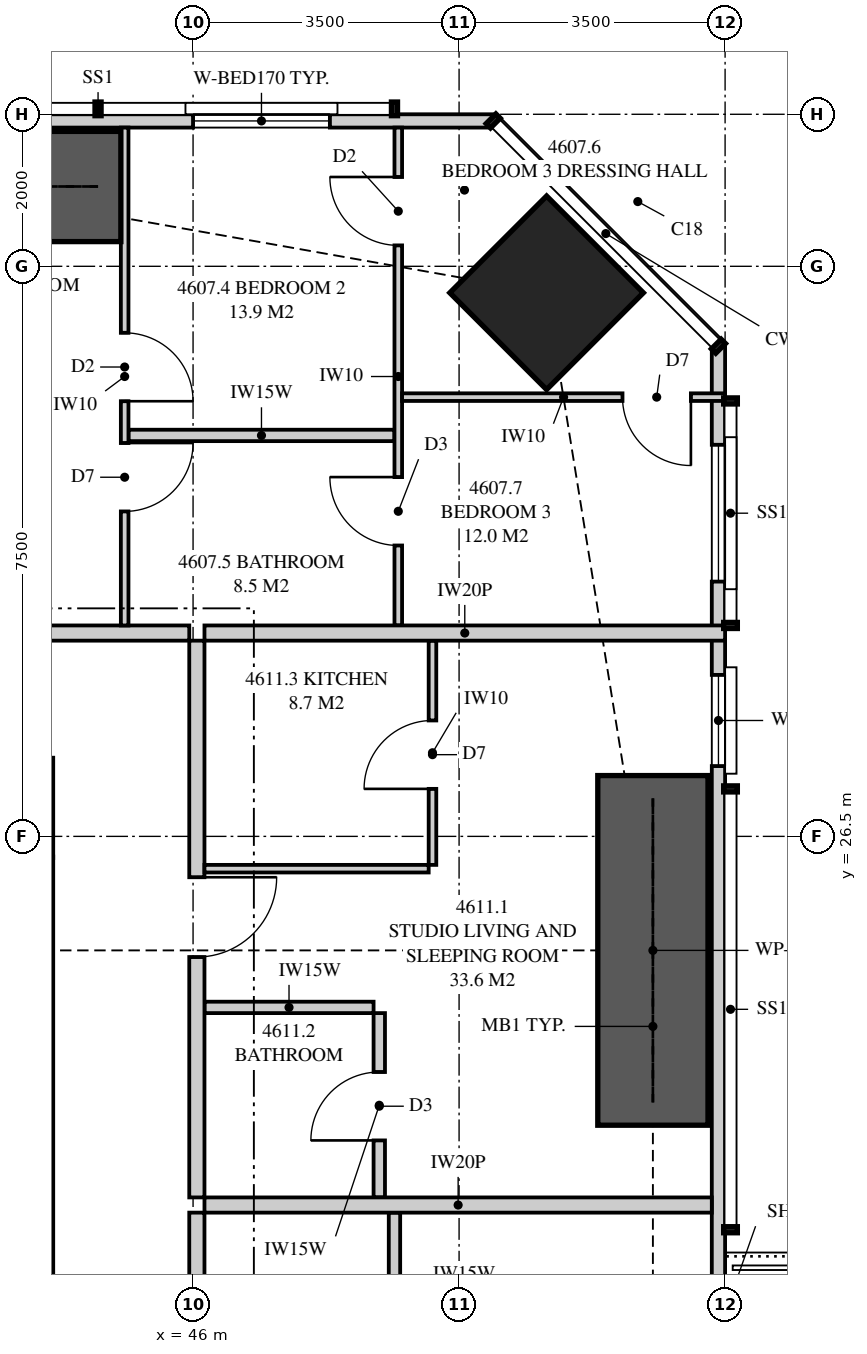
"""IFC4 building model, lengths in metres.
Left out: names, types, materials, properties, quantities, classifications, styles, units other than length and angle.
Written with IfcOpenShell. Run it as: python <this file> out.ifc"""

import sys

from ifc_helpers import new_model, si_unit, direction, frame, frame_2d, origin, origin_2d, place, context, subcontext, project, spatial, polyline, rectangle, outline, extrude, element, fill, save


model = new_model("IFC4")
c1 = context("Model", 3, precision=1e-05, world=origin(), true_north=direction((0.0, 1.0)))
c2 = subcontext(c1, "Body", "Model", "MODEL_VIEW")
j1 = project(units=[si_unit("LENGTHUNIT", "METRE"), si_unit("PLANEANGLEUNIT", "RADIAN")], contexts=[c1])
p1 = place(None, origin())
s1 = spatial("IfcSite", under=j1, at=p1, CompositionType="ELEMENT")
p2 = place(p1, origin())
s2 = spatial("IfcBuilding", under=s1, at=p2, CompositionType="ELEMENT")
p3 = place(p2, frame((0.0, 0.0, 171.1)))
s3 = spatial("IfcBuildingStorey", under=s2, at=p3, CompositionType="ELEMENT", Elevation=171.1)
p4 = place(p3, frame((50.652, 33.652, 0.0), z_axis=(0.0, 0.0, 1.0), x_axis=(0.707106781187, 0.707106781187, 0.0)))
e1 = element("IfcColumn", 1, at=p4, inside=s3, PredefinedType="COLUMN", context=c2, shape_type="SweptSolid", body=[
    extrude(rectangle(XDim=1.8, YDim=1.8, at=origin_2d()), origin(), (0.0, 0.0, 1.0), 3.35),
])
p5 = place(p3, frame((43.8, 19.3, 0.0), z_axis=(0.0, 0.0, 1.0), x_axis=(0.0, 1.0, 0.0)))
e2 = element("IfcWall", 2, at=p5, inside=s3, PredefinedType="SHEAR", context=c2, shape_type="SweptSolid", body=[
    extrude(rectangle(XDim=6.925, YDim=0.7, at=frame_2d((3.462, 0.0))), origin(), (0.0, 0.0, 1.0), 3.35),
])
p6 = place(p3, frame((52.913, 3.051, 0.0), z_axis=(0.0, 0.0, 1.0), x_axis=(0.0, 1.0, 0.0)))
e3 = element("IfcWall", 3, at=p6, inside=s3, PredefinedType="SOLIDWALL", context=c2, shape_type="SweptSolid", body=[
    extrude(outline(polyline([(0.0, 0.0), (29.897, 0.0), (29.897, 3.11), (22.167, 3.11), (22.167, 2.15), (22.074, 2.15), (22.074, 3.11), (21.949, 3.11), (21.949, 2.15), (9.949, 2.15), (9.949, 3.11), (9.847, 3.11), (9.847, 2.15), (9.706, 2.15), (9.706, 3.11), (0.0, 3.11), (0.0, 0.0)])), frame((0.0, 0.087, 0.0), z_axis=(0.0, -1.0, 0.0), x_axis=(1.0, 0.0, 0.0)), (0.0, 0.0, 1.0), 0.175),
])
p7 = place(p6, frame((1.797, 0.0, 0.4)))
e4 = element("IfcOpeningElement", 4, at=p7, cuts=e3, PredefinedType="OPENING", context=c2, shape_type="SweptSolid", body=[
    extrude(rectangle(XDim=1.8, YDim=1.7, at=frame_2d((0.9, 0.85))), frame((0.0, 0.097, 0.0), z_axis=(0.0, -1.0, 0.0), x_axis=(1.0, 0.0, 0.0)), (0.0, 0.0, 1.0), 0.195),
])
p8 = place(p6, frame((5.674, 0.0, 0.4)))
e5 = element("IfcOpeningElement", 5, at=p8, cuts=e3, PredefinedType="OPENING", context=c2, shape_type="SweptSolid", body=[
    extrude(rectangle(XDim=1.8, YDim=1.7, at=frame_2d((0.9, 0.85))), frame((0.0, 0.097, 0.0), z_axis=(0.0, -1.0, 0.0), x_axis=(1.0, 0.0, 0.0)), (0.0, 0.0, 1.0), 0.195),
])
p9 = place(p6, frame((12.349, 0.0, 0.4)))
e6 = element("IfcOpeningElement", 6, at=p9, cuts=e3, PredefinedType="OPENING", context=c2, shape_type="SweptSolid", body=[
    extrude(rectangle(XDim=2.4, YDim=1.7, at=frame_2d((1.2, 0.85))), frame((0.0, 0.097, 0.0), z_axis=(0.0, -1.0, 0.0), x_axis=(1.0, 0.0, 0.0)), (0.0, 0.0, 1.0), 0.195),
])
p10 = place(p6, frame((15.274, 0.0, 0.0)))
e7 = element("IfcOpeningElement", 7, at=p10, cuts=e3, PredefinedType="OPENING", context=c2, shape_type="SweptSolid", body=[
    extrude(rectangle(XDim=1.8, YDim=2.1, at=frame_2d((0.9, 1.05))), frame((0.0, 0.097, 0.0), z_axis=(0.0, -1.0, 0.0), x_axis=(1.0, 0.0, 0.0)), (0.0, 0.0, 1.0), 0.195),
])
p11 = place(p6, frame((24.373, 0.0, 0.4)))
e8 = element("IfcOpeningElement", 8, at=p11, cuts=e3, PredefinedType="OPENING", context=c2, shape_type="SweptSolid", body=[
    extrude(rectangle(XDim=1.2, YDim=1.7, at=frame_2d((0.6, 0.85))), frame((0.0, 0.097, 0.0), z_axis=(0.0, -1.0, 0.0), x_axis=(1.0, 0.0, 0.0)), (0.0, 0.0, 1.0), 0.195),
])
p12 = place(p6, frame((26.801, 0.0, 0.4)))
e9 = element("IfcOpeningElement", 9, at=p12, cuts=e3, PredefinedType="OPENING", context=c2, shape_type="SweptSolid", body=[
    extrude(rectangle(XDim=1.8, YDim=1.7, at=frame_2d((0.9, 0.85))), frame((0.0, 0.097, 0.0), z_axis=(0.0, -1.0, 0.0), x_axis=(1.0, 0.0, 0.0)), (0.0, 0.0, 1.0), 0.195),
])
p13 = place(p3, frame((49.949, 35.913, 0.0), z_axis=(0.0, 0.0, 1.0), x_axis=(-1.0, 0.0, 0.0)))
e10 = element("IfcWall", 10, at=p13, inside=s3, PredefinedType="SOLIDWALL", context=c2, shape_type="SweptSolid", body=[
    extrude(outline(polyline([(0.0, 0.0), (34.897, 0.0), (34.897, 3.11), (27.91, 3.11), (27.91, 2.15), (27.836, 2.15), (27.836, 3.11), (27.699, 3.11), (27.699, 2.15), (7.199, 2.15), (7.199, 3.11), (7.062, 3.11), (7.062, 2.15), (6.987, 2.15), (6.987, 3.11), (0.0, 3.11), (0.0, 0.0)])), frame((0.0, 0.087, 0.0), z_axis=(0.0, -1.0, 0.0), x_axis=(1.0, 0.0, 0.0)), (0.0, 0.0, 1.0), 0.175),
])
p14 = place(p13, frame((2.149, 0.0, 0.4)))
e11 = element("IfcOpeningElement", 11, at=p14, cuts=e10, PredefinedType="OPENING", context=c2, shape_type="SweptSolid", body=[
    extrude(rectangle(XDim=1.8, YDim=1.7, at=frame_2d((0.9, 0.85))), frame((0.0, 0.097, 0.0), z_axis=(0.0, -1.0, 0.0), x_axis=(1.0, 0.0, 0.0)), (0.0, 0.0, 1.0), 0.195),
])
p15 = place(p13, frame((10.299, 0.0, 0.0)))
e12 = element("IfcOpeningElement", 12, at=p15, cuts=e10, PredefinedType="OPENING", context=c2, shape_type="SweptSolid", body=[
    extrude(rectangle(XDim=1.8, YDim=2.1, at=frame_2d((0.9, 1.05))), frame((0.0, 0.097, 0.0), z_axis=(0.0, -1.0, 0.0), x_axis=(1.0, 0.0, 0.0)), (0.0, 0.0, 1.0), 0.195),
])
p16 = place(p13, frame((13.231, 0.0, 0.4)))
e13 = element("IfcOpeningElement", 13, at=p16, cuts=e10, PredefinedType="OPENING", context=c2, shape_type="SweptSolid", body=[
    extrude(rectangle(XDim=1.8, YDim=1.7, at=frame_2d((0.9, 0.85))), frame((0.0, 0.097, 0.0), z_axis=(0.0, -1.0, 0.0), x_axis=(1.0, 0.0, 0.0)), (0.0, 0.0, 1.0), 0.195),
])
p17 = place(p13, frame((22.699, 0.0, 0.0)))
e14 = element("IfcOpeningElement", 14, at=p17, cuts=e10, PredefinedType="OPENING", context=c2, shape_type="SweptSolid", body=[
    extrude(rectangle(XDim=1.8, YDim=2.1, at=frame_2d((0.9, 1.05))), frame((0.0, 0.097, 0.0), z_axis=(0.0, -1.0, 0.0), x_axis=(1.0, 0.0, 0.0)), (0.0, 0.0, 1.0), 0.195),
])
p18 = place(p13, frame((19.853, 0.0, 0.4)))
e15 = element("IfcOpeningElement", 15, at=p18, cuts=e10, PredefinedType="OPENING", context=c2, shape_type="SweptSolid", body=[
    extrude(rectangle(XDim=2.4, YDim=1.7, at=frame_2d((1.2, 0.85))), frame((0.0, 0.097, 0.0), z_axis=(0.0, -1.0, 0.0), x_axis=(1.0, 0.0, 0.0)), (0.0, 0.0, 1.0), 0.195),
])
p19 = place(p13, frame((30.104, 0.0, 0.4)))
e16 = element("IfcOpeningElement", 16, at=p19, cuts=e10, PredefinedType="OPENING", context=c2, shape_type="SweptSolid", body=[
    extrude(rectangle(XDim=2.4, YDim=1.7, at=frame_2d((1.2, 0.85))), frame((0.0, 0.097, 0.0), z_axis=(0.0, -1.0, 0.0), x_axis=(1.0, 0.0, 0.0)), (0.0, 0.0, 1.0), 0.195),
])
p20 = place(p3, frame((45.1, 35.825, 0.0), z_axis=(0.0, 0.0, 1.0), x_axis=(0.0, -1.0, 0.0)))
e17 = element("IfcWall", 17, at=p20, inside=s3, PredefinedType="PARTITIONING", context=c2, shape_type="SweptSolid", body=[
    extrude(outline(polyline([(0.0, 0.0), (6.55, 0.0), (6.55, 3.11), (2.064, 3.11), (2.064, 2.15), (0.318, 2.15), (0.318, 3.11), (0.0, 3.11), (0.0, 0.0)])), frame((0.0, 0.05, 0.0), z_axis=(0.0, -1.0, 0.0), x_axis=(1.0, 0.0, 0.0)), (0.0, 0.0, 1.0), 0.1),
])
p21 = place(p20, frame((2.7, 0.0, 0.0)))
e18 = element("IfcOpeningElement", 18, at=p21, cuts=e17, PredefinedType="OPENING", context=c2, shape_type="SweptSolid", body=[
    extrude(rectangle(XDim=0.9, YDim=2.1, at=frame_2d((0.45, 1.05))), frame((0.0, 0.06, 0.0), z_axis=(0.0, -1.0, 0.0), x_axis=(1.0, 0.0, 0.0)), (0.0, 0.0, 1.0), 0.12),
])
p22 = place(p20, frame((4.15, 0.0, 0.0)))
e19 = element("IfcOpeningElement", 19, at=p22, cuts=e17, PredefinedType="OPENING", context=c2, shape_type="SweptSolid", body=[
    extrude(rectangle(XDim=0.9, YDim=2.1, at=frame_2d((0.45, 1.05))), frame((0.0, 0.06, 0.0), z_axis=(0.0, -1.0, 0.0), x_axis=(1.0, 0.0, 0.0)), (0.0, 0.0, 1.0), 0.12),
])
p23 = place(p3, frame((48.7, 35.825, 0.0), z_axis=(0.0, 0.0, 1.0), x_axis=(0.0, -1.0, 0.0)))
e20 = element("IfcWall", 20, at=p23, inside=s3, PredefinedType="PARTITIONING", context=c2, shape_type="SweptSolid", body=[
    extrude(outline(polyline([(0.0, 0.0), (6.55, 0.0), (6.55, 3.11), (2.701, 3.11), (2.701, 2.15), (0.955, 2.15), (0.955, 3.11), (0.0, 3.11), (0.0, 0.0)])), frame((0.0, 0.05, 0.0), z_axis=(0.0, -1.0, 0.0), x_axis=(1.0, 0.0, 0.0)), (0.0, 0.0, 1.0), 0.1),
])
p24 = place(p23, frame((0.65, 0.0, 0.0)))
e21 = element("IfcOpeningElement", 21, at=p24, cuts=e20, PredefinedType="OPENING", context=c2, shape_type="SweptSolid", body=[
    extrude(rectangle(XDim=0.9, YDim=2.1, at=frame_2d((0.45, 1.05))), frame((0.0, 0.06, 0.0), z_axis=(0.0, -1.0, 0.0), x_axis=(1.0, 0.0, 0.0)), (0.0, 0.0, 1.0), 0.12),
])
p25 = place(p23, frame((4.598, 0.0, 0.0)))
e22 = element("IfcOpeningElement", 22, at=p25, cuts=e20, PredefinedType="OPENING", context=c2, shape_type="SweptSolid", body=[
    extrude(rectangle(XDim=0.9, YDim=2.1, at=frame_2d((0.45, 1.05))), frame((0.0, 0.06, 0.0), z_axis=(0.0, -1.0, 0.0), x_axis=(1.0, 0.0, 0.0)), (0.0, 0.0, 1.0), 0.12),
])
p26 = place(p3, frame((45.15, 31.775, 0.0), z_axis=(0.0, 0.0, 1.0), x_axis=(1.0, 0.0, 0.0)))
e23 = element("IfcWall", 23, at=p26, inside=s3, PredefinedType="PLUMBINGWALL", context=c2, shape_type="SweptSolid", body=[
    extrude(rectangle(XDim=3.5, YDim=0.15, at=frame_2d((1.75, 0.0))), origin(), (0.0, 0.0, 1.0), 3.11),
])
p27 = place(p3, frame((48.75, 32.279, 0.0), z_axis=(0.0, 0.0, 1.0), x_axis=(1.0, 0.0, 0.0)))
e24 = element("IfcWall", 24, at=p27, inside=s3, PredefinedType="PARTITIONING", context=c2, shape_type="SweptSolid", body=[
    extrude(outline(polyline([(0.0, 0.0), (4.25, 0.0), (4.25, 3.11), (2.995, 3.11), (2.995, 2.15), (1.252, 2.15), (1.252, 3.11), (0.0, 3.11), (0.0, 0.0)])), frame((0.0, 0.05, 0.0), z_axis=(0.0, -1.0, 0.0), x_axis=(1.0, 0.0, 0.0)), (0.0, 0.0, 1.0), 0.1),
])
p28 = place(p27, frame((2.9, 0.0, 0.0)))
e25 = element("IfcOpeningElement", 25, at=p28, cuts=e24, PredefinedType="OPENING", context=c2, shape_type="SweptSolid", body=[
    extrude(rectangle(XDim=0.9, YDim=2.1, at=frame_2d((0.45, 1.05))), frame((0.0, 0.06, 0.0), z_axis=(0.0, -1.0, 0.0), x_axis=(1.0, 0.0, 0.0)), (0.0, 0.0, 1.0), 0.12),
])
p29 = place(p3, frame((46.15, 29.175, 0.0), z_axis=(0.0, 0.0, 1.0), x_axis=(1.0, 0.0, 0.0)))
e26 = element("IfcWall", 26, at=p29, inside=s3, PredefinedType="PARTITIONING", context=c2, shape_type="SweptSolid", body=[
    extrude(outline(polyline([(0.0, 0.0), (6.85, 0.0), (6.85, 3.11), (6.147, 3.11), (6.147, 2.15), (4.303, 2.15), (4.303, 3.11), (0.0, 3.11), (0.0, 0.0)])), frame((0.0, 0.1, 0.0), z_axis=(0.0, -1.0, 0.0), x_axis=(1.0, 0.0, 0.0)), (0.0, 0.0, 1.0), 0.2),
])
p30 = place(p3, frame((52.825, 21.65, 0.0), z_axis=(0.0, 0.0, 1.0), x_axis=(-1.0, 0.0, 0.0)))
e27 = element("IfcWall", 27, at=p30, inside=s3, PredefinedType="PARTITIONING", context=c2, shape_type="SweptSolid", body=[
    extrude(outline(polyline([(0.0, 0.0), (6.675, 0.0), (6.675, 3.11), (1.685, 3.11), (1.685, 2.15), (0.0, 2.15), (0.0, 3.11), (0.0, 0.0)])), frame((0.0, 0.1, 0.0), z_axis=(0.0, -1.0, 0.0), x_axis=(1.0, 0.0, 0.0)), (0.0, 0.0, 1.0), 0.2),
])
p31 = place(p3, frame((48.65, 18.1, 0.0), z_axis=(0.0, 0.0, 1.0), x_axis=(0.0, 1.0, 0.0)))
e28 = element("IfcWall", 28, at=p31, inside=s3, PredefinedType="PLUMBINGWALL", context=c2, shape_type="SweptSolid", body=[
    extrude(rectangle(XDim=3.45, YDim=0.15, at=frame_2d((1.725, 0.0))), origin(), (0.0, 0.0, 1.0), 3.11),
])
p32 = place(p3, frame((46.05, 21.75, 0.0), z_axis=(0.0, 0.0, 1.0), x_axis=(0.0, 1.0, 0.0)))
e29 = element("IfcWall", 29, at=p32, inside=s3, PredefinedType="PARTITIONING", context=c2, shape_type="SweptSolid", body=[
    extrude(outline(polyline([(0.0, 0.0), (7.325, 0.0), (7.325, 3.11), (3.587, 3.11), (3.587, 2.541), (2.913, 2.541), (2.913, 3.11), (0.0, 3.11), (0.0, 0.0)])), frame((0.0, 0.1, 0.0), z_axis=(0.0, -1.0, 0.0), x_axis=(1.0, 0.0, 0.0)), (0.0, 0.0, 1.0), 0.2),
])
p33 = place(p32, frame((3.163, 0.0, 0.0)))
e30 = element("IfcOpeningElement", 30, at=p33, cuts=e29, PredefinedType="OPENING", context=c2, shape_type="SweptSolid", body=[
    extrude(rectangle(XDim=1.05, YDim=2.2, at=frame_2d((0.525, 1.1))), frame((0.0, 0.11, 0.0), z_axis=(0.0, -1.0, 0.0), x_axis=(1.0, 0.0, 0.0)), (0.0, 0.0, 1.0), 0.22),
])
p34 = place(p3, frame((48.45, 21.75, 0.0), z_axis=(0.0, 0.0, 1.0), x_axis=(0.0, 1.0, 0.0)))
e31 = element("IfcWall", 31, at=p34, inside=s3, PredefinedType="PLUMBINGWALL", context=c2, shape_type="SweptSolid", body=[
    extrude(rectangle(XDim=2.425, YDim=0.15, at=frame_2d((1.212, 0.0))), origin(), (0.0, 0.0, 1.0), 3.11),
])
p35 = place(p34, frame((0.75, 0.0, 0.0)))
e32 = element("IfcOpeningElement", 32, at=p35, cuts=e31, PredefinedType="OPENING", context=c2, shape_type="SweptSolid", body=[
    extrude(rectangle(XDim=0.9, YDim=2.1, at=frame_2d((0.45, 1.05))), frame((0.0, 0.085, 0.0), z_axis=(0.0, -1.0, 0.0), x_axis=(1.0, 0.0, 0.0)), (0.0, 0.0, 1.0), 0.17),
])
p36 = place(p3, frame((48.375, 24.25, 0.0), z_axis=(0.0, 0.0, 1.0), x_axis=(-1.0, 0.0, 0.0)))
e33 = element("IfcWall", 33, at=p36, inside=s3, PredefinedType="PLUMBINGWALL", context=c2, shape_type="SweptSolid", body=[
    extrude(rectangle(XDim=2.225, YDim=0.15, at=frame_2d((1.113, 0.0))), origin(), (0.0, 0.0, 1.0), 3.11),
])
p37 = place(p3, frame((49.15, 26.125, 0.0), z_axis=(0.0, 0.0, 1.0), x_axis=(0.0, 1.0, 0.0)))
e34 = element("IfcWall", 34, at=p37, inside=s3, PredefinedType="PARTITIONING", context=c2, shape_type="SweptSolid", body=[
    extrude(rectangle(XDim=2.95, YDim=0.1, at=frame_2d((1.475, 0.0))), origin(), (0.0, 0.0, 1.0), 3.11),
])
p38 = place(p37, frame((1.0, 0.0, 0.0)))
e35 = element("IfcOpeningElement", 35, at=p38, cuts=e34, PredefinedType="OPENING", context=c2, shape_type="SweptSolid", body=[
    extrude(rectangle(XDim=0.9, YDim=2.1, at=frame_2d((0.45, 1.05))), frame((0.0, 0.06, 0.0), z_axis=(0.0, -1.0, 0.0), x_axis=(1.0, 0.0, 0.0)), (0.0, 0.0, 1.0), 0.12),
])
p39 = place(p3, frame((49.1, 26.075, 0.0), z_axis=(0.0, 0.0, 1.0), x_axis=(-1.0, 0.0, 0.0)))
e36 = element("IfcWall", 36, at=p39, inside=s3, PredefinedType="PARTITIONING", context=c2, shape_type="SweptSolid", body=[
    extrude(rectangle(XDim=2.95, YDim=0.1, at=frame_2d((1.475, 0.0))), origin(), (0.0, 0.0, 1.0), 3.11),
])
p40 = place(p3, frame((43.75, 29.175, 0.0), z_axis=(0.0, 0.0, 1.0), x_axis=(1.0, 0.0, 0.0)))
e37 = element("IfcWall", 37, at=p40, inside=s3, PredefinedType="PARTITIONING", context=c2, shape_type="SweptSolid", body=[
    extrude(rectangle(XDim=2.2, YDim=0.2, at=frame_2d((1.1, 0.0))), origin(), (0.0, 0.0, 1.0), 3.11),
])
p41 = place(p3, frame((46.05, 16.738, 0.0), z_axis=(0.0, 0.0, 1.0), x_axis=(0.0, 1.0, 0.0)))
e38 = element("IfcWall", 38, at=p41, inside=s3, PredefinedType="PARTITIONING", context=c2, shape_type="SweptSolid", body=[
    extrude(rectangle(XDim=4.812, YDim=0.2, at=frame_2d((2.406, 0.0))), origin(), (0.0, 0.0, 1.0), 3.11),
])
for number, where, z_axis, x_axis in (
    (39, (52.05, 22.7, 0.0), (0.0, 0.0, 1.0), (0.0, 1.0, 0.0)),
    (40, (40.45, 35.05, 0.0), (0.0, 0.0, 1.0), (1.0, 0.0, 0.0)),
):
    element("IfcWall", number, at=place(p3, frame(where, z_axis=z_axis, x_axis=x_axis)), inside=s3, PredefinedType="SHEAR", context=c2, shape_type="SweptSolid", body=[
        extrude(rectangle(XDim=4.6, YDim=1.45, at=frame_2d((2.3, 0.0))), origin(), (0.0, 0.0, 1.0), 3.35),
    ])
p42 = place(p11, origin())
e41 = element("IfcWindow", 41, at=p42, inside=s3, PartitioningType="SINGLE_PANEL", PredefinedType="WINDOW", context=c2, shape_type="SweptSolid", body=[
    extrude(rectangle(XDim=1.2, YDim=1.7, at=frame_2d((0.6, 0.85))), frame((0.0, 0.03, 0.0), z_axis=(0.0, -1.0, 0.0), x_axis=(1.0, 0.0, 0.0)), (0.0, 0.0, 1.0), 0.06),
])
fill(e8, e41)
p43 = place(p12, origin())
e42 = element("IfcWindow", 42, at=p43, inside=s3, PartitioningType="SINGLE_PANEL", PredefinedType="WINDOW", context=c2, shape_type="SweptSolid", body=[
    extrude(rectangle(XDim=1.8, YDim=1.7, at=frame_2d((0.9, 0.85))), frame((0.0, 0.03, 0.0), z_axis=(0.0, -1.0, 0.0), x_axis=(1.0, 0.0, 0.0)), (0.0, 0.0, 1.0), 0.06),
])
fill(e9, e42)
p44 = place(p14, origin())
e43 = element("IfcWindow", 43, at=p44, inside=s3, PartitioningType="SINGLE_PANEL", PredefinedType="WINDOW", context=c2, shape_type="SweptSolid", body=[
    extrude(rectangle(XDim=1.8, YDim=1.7, at=frame_2d((0.9, 0.85))), frame((0.0, 0.03, 0.0), z_axis=(0.0, -1.0, 0.0), x_axis=(1.0, 0.0, 0.0)), (0.0, 0.0, 1.0), 0.06),
])
fill(e11, e43)
p45 = place(p21, origin())
e44 = element("IfcDoor", 44, at=p45, inside=s3, OperationType="SINGLE_SWING_RIGHT", PredefinedType="DOOR", context=c2, shape_type="SweptSolid", body=[
    extrude(rectangle(XDim=0.9, YDim=2.1, at=frame_2d((0.45, 1.05))), frame((0.0, 0.025, 0.0), z_axis=(0.0, -1.0, 0.0), x_axis=(1.0, 0.0, 0.0)), (0.0, 0.0, 1.0), 0.05),
])
fill(e18, e44)
p46 = place(p22, origin())
e45 = element("IfcDoor", 45, at=p46, inside=s3, OperationType="SINGLE_SWING_LEFT", PredefinedType="DOOR", context=c2, shape_type="SweptSolid", body=[
    extrude(rectangle(XDim=0.9, YDim=2.1, at=frame_2d((0.45, 1.05))), frame((0.0, 0.025, 0.0), z_axis=(0.0, -1.0, 0.0), x_axis=(1.0, 0.0, 0.0)), (0.0, 0.0, 1.0), 0.05),
])
fill(e19, e45)
p47 = place(p28, frame((0.9, 0.0, 0.0), z_axis=(0.0, 0.0, 1.0), x_axis=(-1.0, 0.0, 0.0)))
e46 = element("IfcDoor", 46, at=p47, inside=s3, OperationType="SINGLE_SWING_LEFT", PredefinedType="DOOR", context=c2, shape_type="SweptSolid", body=[
    extrude(rectangle(XDim=0.9, YDim=2.1, at=frame_2d((0.45, 1.05))), frame((0.0, 0.025, 0.0), z_axis=(0.0, -1.0, 0.0), x_axis=(1.0, 0.0, 0.0)), (0.0, 0.0, 1.0), 0.05),
])
fill(e25, e46)
p48 = place(p24, frame((0.9, 0.0, 0.0), z_axis=(0.0, 0.0, 1.0), x_axis=(-1.0, 0.0, 0.0)))
e47 = element("IfcDoor", 47, at=p48, inside=s3, OperationType="SINGLE_SWING_RIGHT", PredefinedType="DOOR", context=c2, shape_type="SweptSolid", body=[
    extrude(rectangle(XDim=0.9, YDim=2.1, at=frame_2d((0.45, 1.05))), frame((0.0, 0.025, 0.0), z_axis=(0.0, -1.0, 0.0), x_axis=(1.0, 0.0, 0.0)), (0.0, 0.0, 1.0), 0.05),
])
fill(e21, e47)
p49 = place(p25, frame((0.9, 0.0, 0.0), z_axis=(0.0, 0.0, 1.0), x_axis=(-1.0, 0.0, 0.0)))
e48 = element("IfcDoor", 48, at=p49, inside=s3, OperationType="SINGLE_SWING_RIGHT", PredefinedType="DOOR", context=c2, shape_type="SweptSolid", body=[
    extrude(rectangle(XDim=0.9, YDim=2.1, at=frame_2d((0.45, 1.05))), frame((0.0, 0.025, 0.0), z_axis=(0.0, -1.0, 0.0), x_axis=(1.0, 0.0, 0.0)), (0.0, 0.0, 1.0), 0.05),
])
fill(e22, e48)
p50 = place(p33, frame((1.05, 0.0, 0.0), z_axis=(0.0, 0.0, 1.0), x_axis=(-1.0, 0.0, 0.0)))
e49 = element("IfcDoor", 49, at=p50, inside=s3, OperationType="SINGLE_SWING_LEFT", PredefinedType="DOOR", context=c2, shape_type="SweptSolid", body=[
    extrude(rectangle(XDim=1.05, YDim=2.2, at=frame_2d((0.525, 1.1))), frame((0.0, 0.025, 0.0), z_axis=(0.0, -1.0, 0.0), x_axis=(1.0, 0.0, 0.0)), (0.0, 0.0, 1.0), 0.05),
])
fill(e30, e49)
p51 = place(p35, origin())
e50 = element("IfcDoor", 50, at=p51, inside=s3, OperationType="SINGLE_SWING_LEFT", PredefinedType="DOOR", context=c2, shape_type="SweptSolid", body=[
    extrude(rectangle(XDim=0.9, YDim=2.1, at=frame_2d((0.45, 1.05))), frame((0.0, 0.025, 0.0), z_axis=(0.0, -1.0, 0.0), x_axis=(1.0, 0.0, 0.0)), (0.0, 0.0, 1.0), 0.05),
])
fill(e32, e50)
p52 = place(p38, origin())
e51 = element("IfcDoor", 51, at=p52, inside=s3, OperationType="SINGLE_SWING_LEFT", PredefinedType="DOOR", context=c2, shape_type="SweptSolid", body=[
    extrude(rectangle(XDim=0.9, YDim=2.1, at=frame_2d((0.45, 1.05))), frame((0.0, 0.025, 0.0), z_axis=(0.0, -1.0, 0.0), x_axis=(1.0, 0.0, 0.0)), (0.0, 0.0, 1.0), 0.05),
])
fill(e35, e51)
save(model, sys.argv[1])
